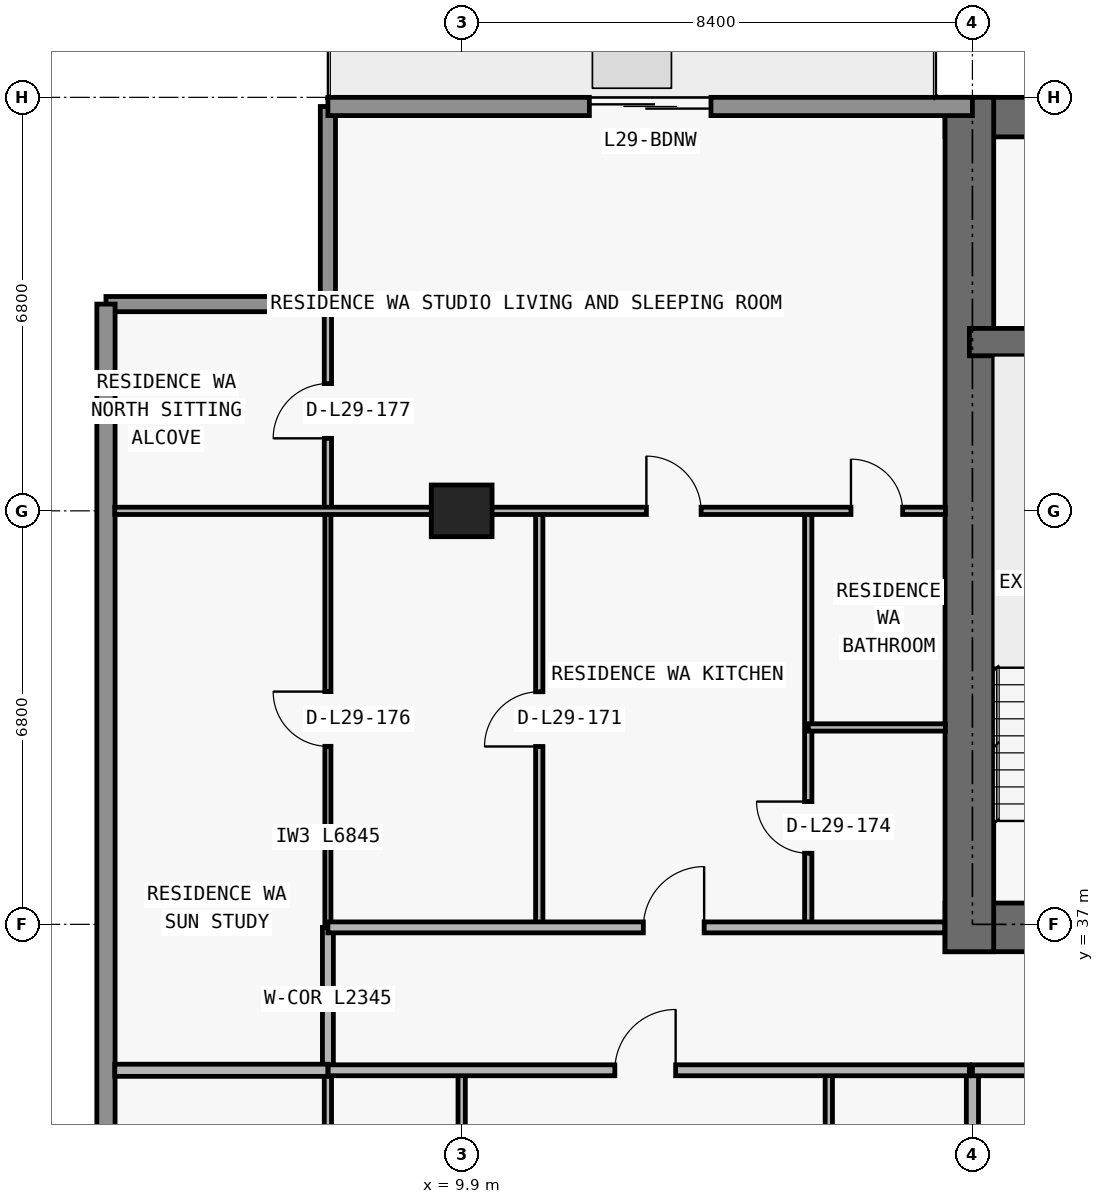
"""IFC4 building model, lengths in metres.
Left out: names, types, materials, properties, quantities, classifications, styles, units other than length and angle.
Written with IfcOpenShell. Run it as: python <this file> out.ifc"""

import sys

from ifc_helpers import new_model, si_unit, direction, frame, frame_2d, origin, origin_2d, place, context, subcontext, project, spatial, rectangle, extrude, element, fill, save


model = new_model("IFC4")
c1 = context("Model", 3, precision=1e-05, world=origin(), true_north=direction((0.0, 1.0)))
c2 = subcontext(c1, "Body", "Model", "MODEL_VIEW")
j1 = project(units=[si_unit("LENGTHUNIT", "METRE"), si_unit("PLANEANGLEUNIT", "RADIAN")], contexts=[c1])
p1 = place(None, origin())
s1 = spatial("IfcSite", under=j1, at=p1, CompositionType="ELEMENT")
p2 = place(p1, origin())
s2 = spatial("IfcBuilding", under=s1, at=p2, CompositionType="ELEMENT")
p3 = place(p2, frame((0.0, 0.0, 109.2)))
s3 = spatial("IfcBuildingStorey", under=s2, at=p3, CompositionType="ELEMENT", Elevation=109.2)
p4 = place(p3, frame((9.9, 43.8, 0.0), z_axis=(0.0, 0.0, 1.0), x_axis=(1.0, 0.0, 0.0)))
e1 = element("IfcColumn", 1, at=p4, inside=s3, PredefinedType="COLUMN", context=c2, shape_type="SweptSolid", body=[
    extrude(rectangle(XDim=1.0, YDim=0.85, at=origin_2d()), origin(), (0.0, 0.0, 1.0), 3.05),
])
p5 = place(p3, frame((17.85, 36.95, 0.0), z_axis=(0.0, 0.0, 1.0), x_axis=(1.0, 0.0, 0.0)))
e2 = element("IfcWall", 2, at=p5, inside=s3, PredefinedType="SHEAR", context=c2, shape_type="SweptSolid", body=[
    extrude(rectangle(XDim=42.1, YDim=0.8, at=frame_2d((21.05, 0.0))), origin(), (0.0, 0.0, 1.0), 3.05),
])
p6 = place(p5, frame((14.45, 0.0, 0.0)))
e3 = element("IfcOpeningElement", 3, at=p6, cuts=e2, PredefinedType="OPENING", context=c2, shape_type="SweptSolid", body=[
    extrude(rectangle(XDim=1.1, YDim=2.15, at=frame_2d((0.55, 1.075))), frame((0.0, 0.41, 0.0), z_axis=(0.0, -1.0, 0.0), x_axis=(1.0, 0.0, 0.0)), (0.0, 0.0, 1.0), 0.82),
])
p7 = place(p5, frame((6.3, 0.0, 0.0)))
e4 = element("IfcOpeningElement", 4, at=p7, cuts=e2, PredefinedType="OPENING", context=c2, shape_type="SweptSolid", body=[
    extrude(rectangle(XDim=1.05, YDim=2.15, at=frame_2d((0.525, 1.075))), frame((0.0, 0.41, 0.0), z_axis=(0.0, -1.0, 0.0), x_axis=(1.0, 0.0, 0.0)), (0.0, 0.0, 1.0), 0.82),
])
p8 = place(p5, frame((34.8, 0.0, 0.0)))
e5 = element("IfcOpeningElement", 5, at=p8, cuts=e2, PredefinedType="OPENING", context=c2, shape_type="SweptSolid", body=[
    extrude(rectangle(XDim=1.05, YDim=2.15, at=frame_2d((0.525, 1.075))), frame((0.0, 0.41, 0.0), z_axis=(0.0, -1.0, 0.0), x_axis=(1.0, 0.0, 0.0)), (0.0, 0.0, 1.0), 0.82),
])
p9 = place(p5, frame((10.913, 0.0, 0.0)))
e6 = element("IfcOpeningElement", 6, at=p9, cuts=e2, PredefinedType="OPENING", context=c2, shape_type="SweptSolid", body=[
    extrude(rectangle(XDim=1.05, YDim=2.15, at=frame_2d((0.525, 1.075))), frame((0.0, 0.41, 0.0), z_axis=(0.0, -1.0, 0.0), x_axis=(1.0, 0.0, 0.0)), (0.0, 0.0, 1.0), 0.82),
])
p10 = place(p5, frame((24.15, 0.0, 0.0)))
e7 = element("IfcOpeningElement", 7, at=p10, cuts=e2, PredefinedType="OPENING", context=c2, shape_type="SweptSolid", body=[
    extrude(rectangle(XDim=1.05, YDim=2.15, at=frame_2d((0.525, 1.075))), frame((0.0, 0.41, 0.0), z_axis=(0.0, -1.0, 0.0), x_axis=(1.0, 0.0, 0.0)), (0.0, 0.0, 1.0), 0.82),
])
p11 = place(p3, frame((17.85, 50.275, 0.0), z_axis=(0.0, 0.0, 1.0), x_axis=(1.0, 0.0, 0.0)))
e8 = element("IfcWall", 8, at=p11, inside=s3, PredefinedType="SHEAR", context=c2, shape_type="SweptSolid", body=[
    extrude(rectangle(XDim=42.1, YDim=0.65, at=frame_2d((21.05, 0.0))), origin(), (0.0, 0.0, 1.0), 3.05),
])
p12 = place(p3, frame((18.25, 36.55, 0.0), z_axis=(0.0, 0.0, 1.0), x_axis=(0.0, 1.0, 0.0)))
e9 = element("IfcWall", 9, at=p12, inside=s3, PredefinedType="SHEAR", context=c2, shape_type="SweptSolid", body=[
    extrude(rectangle(XDim=14.05, YDim=0.8, at=frame_2d((7.025, 0.0))), origin(), (0.0, 0.0, 1.0), 3.05),
])
p13 = place(p3, frame((18.25, 46.575, 0.0), z_axis=(0.0, 0.0, 1.0), x_axis=(1.0, 0.0, 0.0)))
e10 = element("IfcWall", 10, at=p13, inside=s3, PredefinedType="SHEAR", context=c2, shape_type="SweptSolid", body=[
    extrude(rectangle(XDim=41.3, YDim=0.45, at=frame_2d((20.65, 0.0))), origin(), (0.0, 0.0, 1.0), 3.05),
])
p14 = place(p13, frame((7.625, 0.0, 0.0)))
e11 = element("IfcOpeningElement", 11, at=p14, cuts=e10, PredefinedType="OPENING", context=c2, shape_type="SweptSolid", body=[
    extrude(rectangle(XDim=1.05, YDim=2.15, at=frame_2d((0.525, 1.075))), frame((0.0, 0.235, 0.0), z_axis=(0.0, -1.0, 0.0), x_axis=(1.0, 0.0, 0.0)), (0.0, 0.0, 1.0), 0.47),
])
p15 = place(p13, frame((32.675, 0.0, 0.0)))
e12 = element("IfcOpeningElement", 12, at=p15, cuts=e10, PredefinedType="OPENING", context=c2, shape_type="SweptSolid", body=[
    extrude(rectangle(XDim=1.05, YDim=2.15, at=frame_2d((0.525, 1.075))), frame((0.0, 0.235, 0.0), z_axis=(0.0, -1.0, 0.0), x_axis=(1.0, 0.0, 0.0)), (0.0, 0.0, 1.0), 0.47),
])
p16 = place(p3, frame((4.05, 47.2, 0.0), z_axis=(0.0, 0.0, 1.0), x_axis=(1.0, 0.0, 0.0)))
e13 = element("IfcWall", 13, at=p16, inside=s3, PredefinedType="ELEMENTEDWALL", context=c2, shape_type="SweptSolid", body=[
    extrude(rectangle(XDim=3.65, YDim=0.25, at=frame_2d((1.825, 0.0))), origin(), (0.0, 0.0, 1.0), 3.05),
])
p17 = place(p3, frame((7.7, 47.2, 0.0), z_axis=(0.0, 0.0, 1.0), x_axis=(0.0, 1.0, 0.0)))
e14 = element("IfcWall", 14, at=p17, inside=s3, PredefinedType="ELEMENTEDWALL", context=c2, shape_type="SweptSolid", body=[
    extrude(rectangle(XDim=3.25, YDim=0.25, at=frame_2d((1.625, 0.0))), origin(), (0.0, 0.0, 1.0), 3.05),
])
p18 = place(p3, frame((4.05, 28.0, 0.0), z_axis=(0.0, 0.0, 1.0), x_axis=(0.0, 1.0, 0.0)))
e15 = element("IfcWall", 15, at=p18, inside=s3, PredefinedType="STANDARD", context=c2, shape_type="SweptSolid", body=[
    extrude(rectangle(XDim=19.2, YDim=0.3, at=frame_2d((9.6, 0.0))), origin(), (0.0, 0.0, 1.0), 3.05),
])
p19 = place(p3, frame((7.7, 50.45, 0.0), z_axis=(0.0, 0.0, 1.0), x_axis=(1.0, 0.0, 0.0)))
e16 = element("IfcWall", 16, at=p19, inside=s3, PredefinedType="STANDARD", context=c2, shape_type="SweptSolid", body=[
    extrude(rectangle(XDim=10.6, YDim=0.3, at=frame_2d((5.3, 0.0))), origin(), (0.0, 0.0, 1.0), 3.05),
])
p20 = place(p19, frame((4.3, 0.0, 0.0)))
e17 = element("IfcOpeningElement", 17, at=p20, cuts=e16, PredefinedType="OPENING", context=c2, shape_type="SweptSolid", body=[
    extrude(rectangle(XDim=2.0, YDim=2.3, at=frame_2d((1.0, 1.15))), frame((0.0, 0.16, 0.0), z_axis=(0.0, -1.0, 0.0), x_axis=(1.0, 0.0, 0.0)), (0.0, 0.0, 1.0), 0.32),
])
p21 = place(p3, frame((7.7, 30.24, 0.0), z_axis=(0.0, 0.0, 1.0), x_axis=(0.0, 1.0, 0.0)))
e18 = element("IfcWall", 18, at=p21, inside=s3, PredefinedType="PARTITIONING", context=c2, shape_type="SweptSolid", body=[
    extrude(rectangle(XDim=4.36, YDim=0.12, at=frame_2d((2.18, 0.0))), origin(), (0.0, 0.0, 1.0), 3.05),
])
p22 = place(p3, frame((7.7, 34.605, 0.0), z_axis=(0.0, 0.0, 1.0), x_axis=(0.0, 1.0, 0.0)))
e19 = element("IfcWall", 19, at=p22, inside=s3, PredefinedType="PARTITIONING", context=c2, shape_type="SweptSolid", body=[
    extrude(rectangle(XDim=2.345, YDim=0.18, at=frame_2d((1.172, 0.0))), origin(), (0.0, 0.0, 1.0), 3.05),
])
p23 = place(p3, frame((7.7, 36.955, 0.0), z_axis=(0.0, 0.0, 1.0), x_axis=(0.0, 1.0, 0.0)))
e20 = element("IfcWall", 20, at=p23, inside=s3, PredefinedType="MOVABLE", context=c2, shape_type="SweptSolid", body=[
    extrude(rectangle(XDim=6.845, YDim=0.1, at=frame_2d((3.422, 0.0))), origin(), (0.0, 0.0, 1.0), 3.05),
])
p24 = place(p23, frame((2.972, 0.0, 0.0)))
e21 = element("IfcOpeningElement", 21, at=p24, cuts=e20, PredefinedType="OPENING", context=c2, shape_type="SweptSolid", body=[
    extrude(rectangle(XDim=0.9, YDim=2.15, at=frame_2d((0.45, 1.075))), frame((0.0, 0.06, 0.0), z_axis=(0.0, -1.0, 0.0), x_axis=(1.0, 0.0, 0.0)), (0.0, 0.0, 1.0), 0.12),
])
p25 = place(p3, frame((7.7, 43.805, 0.0), z_axis=(0.0, 0.0, 1.0), x_axis=(0.0, 1.0, 0.0)))
e22 = element("IfcWall", 22, at=p25, inside=s3, PredefinedType="PARTITIONING", context=c2, shape_type="SweptSolid", body=[
    extrude(rectangle(XDim=3.275, YDim=0.12, at=frame_2d((1.638, 0.0))), origin(), (0.0, 0.0, 1.0), 3.05),
])
p26 = place(p25, frame((1.188, 0.0, 0.0)))
e23 = element("IfcOpeningElement", 23, at=p26, cuts=e22, PredefinedType="OPENING", context=c2, shape_type="SweptSolid", body=[
    extrude(rectangle(XDim=0.9, YDim=2.15, at=frame_2d((0.45, 1.075))), frame((0.0, 0.07, 0.0), z_axis=(0.0, -1.0, 0.0), x_axis=(1.0, 0.0, 0.0)), (0.0, 0.0, 1.0), 0.14),
])
p27 = place(p3, frame((9.9, 30.24, 0.0), z_axis=(0.0, 0.0, 1.0), x_axis=(0.0, 1.0, 0.0)))
e24 = element("IfcWall", 24, at=p27, inside=s3, PredefinedType="PARTITIONING", context=c2, shape_type="SweptSolid", body=[
    extrude(rectangle(XDim=4.36, YDim=0.12, at=frame_2d((2.18, 0.0))), origin(), (0.0, 0.0, 1.0), 2.174),
])
p28 = place(p3, frame((11.176, 36.95, 0.0), z_axis=(0.0, 0.0, 1.0), x_axis=(0.0, 1.0, 0.0)))
e25 = element("IfcWall", 25, at=p28, inside=s3, PredefinedType="PARTITIONING", context=c2, shape_type="SweptSolid", body=[
    extrude(rectangle(XDim=6.85, YDim=0.12, at=frame_2d((3.425, 0.0))), origin(), (0.0, 0.0, 1.0), 3.05),
])
p29 = place(p28, frame((2.975, 0.0, 0.0)))
e26 = element("IfcOpeningElement", 26, at=p29, cuts=e25, PredefinedType="OPENING", context=c2, shape_type="SweptSolid", body=[
    extrude(rectangle(XDim=0.9, YDim=2.15, at=frame_2d((0.45, 1.075))), frame((0.0, 0.07, 0.0), z_axis=(0.0, -1.0, 0.0), x_axis=(1.0, 0.0, 0.0)), (0.0, 0.0, 1.0), 0.14),
])
p30 = place(p3, frame((15.6, 36.95, 0.0), z_axis=(0.0, 0.0, 1.0), x_axis=(0.0, 1.0, 0.0)))
e27 = element("IfcWall", 27, at=p30, inside=s3, PredefinedType="PARTITIONING", context=c2, shape_type="SweptSolid", body=[
    extrude(rectangle(XDim=6.85, YDim=0.12, at=frame_2d((3.425, 0.0))), origin(), (0.0, 0.0, 1.0), 3.05),
])
p31 = place(p30, frame((1.219, 0.0, 0.0)))
e28 = element("IfcOpeningElement", 28, at=p31, cuts=e27, PredefinedType="OPENING", context=c2, shape_type="SweptSolid", body=[
    extrude(rectangle(XDim=0.85, YDim=2.1, at=frame_2d((0.425, 1.05))), frame((0.0, 0.07, 0.0), z_axis=(0.0, -1.0, 0.0), x_axis=(1.0, 0.0, 0.0)), (0.0, 0.0, 1.0), 0.14),
])
p32 = place(p3, frame((15.938, 30.24, 0.0), z_axis=(0.0, 0.0, 1.0), x_axis=(0.0, 1.0, 0.0)))
e29 = element("IfcWall", 29, at=p32, inside=s3, PredefinedType="PARTITIONING", context=c2, shape_type="SweptSolid", body=[
    extrude(rectangle(XDim=4.36, YDim=0.12, at=frame_2d((2.18, 0.0))), origin(), (0.0, 0.0, 1.0), 3.05),
])
p33 = place(p32, frame((1.755, 0.0, 0.0)))
e30 = element("IfcOpeningElement", 30, at=p33, cuts=e29, PredefinedType="OPENING", context=c2, shape_type="SweptSolid", body=[
    extrude(rectangle(XDim=0.85, YDim=2.1, at=frame_2d((0.425, 1.05))), frame((0.0, 0.07, 0.0), z_axis=(0.0, -1.0, 0.0), x_axis=(1.0, 0.0, 0.0)), (0.0, 0.0, 1.0), 0.14),
])
p34 = place(p3, frame((18.3, 30.24, 0.0), z_axis=(0.0, 0.0, 1.0), x_axis=(0.0, 1.0, 0.0)))
e31 = element("IfcWall", 31, at=p34, inside=s3, PredefinedType="PARTITIONING", context=c2, shape_type="SweptSolid", body=[
    extrude(rectangle(XDim=4.36, YDim=0.2, at=frame_2d((2.18, 0.0))), origin(), (0.0, 0.0, 1.0), 2.174),
])
p35 = place(p3, frame((4.195, 34.6, 0.0), z_axis=(0.0, 0.0, 1.0), x_axis=(1.0, 0.0, 0.0)))
e32 = element("IfcWall", 32, at=p35, inside=s3, PredefinedType="PARTITIONING", context=c2, shape_type="SweptSolid", body=[
    extrude(rectangle(XDim=3.505, YDim=0.2, at=frame_2d((1.752, 0.0))), origin(), (0.0, 0.0, 1.0), 3.05),
])
p36 = place(p3, frame((7.705, 34.6, 0.0), z_axis=(0.0, 0.0, 1.0), x_axis=(1.0, 0.0, 0.0)))
e33 = element("IfcWall", 33, at=p36, inside=s3, PredefinedType="PARTITIONING", context=c2, shape_type="SweptSolid", body=[
    extrude(rectangle(XDim=10.545, YDim=0.18, at=frame_2d((5.272, 0.0))), origin(), (0.0, 0.0, 1.0), 3.05),
])
p37 = place(p36, frame((4.714, 0.0, 0.0)))
e34 = element("IfcOpeningElement", 34, at=p37, cuts=e33, PredefinedType="OPENING", context=c2, shape_type="SweptSolid", body=[
    extrude(rectangle(XDim=1.0, YDim=2.2, at=frame_2d((0.5, 1.1))), frame((0.0, 0.1, 0.0), z_axis=(0.0, -1.0, 0.0), x_axis=(1.0, 0.0, 0.0)), (0.0, 0.0, 1.0), 0.2),
])
p38 = place(p3, frame((18.3, 34.6, 0.0), z_axis=(0.0, 0.0, 1.0), x_axis=(1.0, 0.0, 0.0)))
e35 = element("IfcWall", 35, at=p38, inside=s3, PredefinedType="PARTITIONING", context=c2, shape_type="SweptSolid", body=[
    extrude(rectangle(XDim=8.35, YDim=0.18, at=frame_2d((4.175, 0.0))), origin(), (0.0, 0.0, 1.0), 3.05),
])
p39 = place(p38, frame((2.691, 0.0, 0.0)))
e36 = element("IfcOpeningElement", 36, at=p39, cuts=e35, PredefinedType="OPENING", context=c2, shape_type="SweptSolid", body=[
    extrude(rectangle(XDim=1.0, YDim=2.2, at=frame_2d((0.5, 1.1))), frame((0.0, 0.1, 0.0), z_axis=(0.0, -1.0, 0.0), x_axis=(1.0, 0.0, 0.0)), (0.0, 0.0, 1.0), 0.2),
])
p40 = place(p3, frame((7.7, 36.95, 0.0), z_axis=(0.0, 0.0, 1.0), x_axis=(1.0, 0.0, 0.0)))
e37 = element("IfcWall", 37, at=p40, inside=s3, PredefinedType="PARTITIONING", context=c2, shape_type="SweptSolid", body=[
    extrude(rectangle(XDim=10.145, YDim=0.18, at=frame_2d((5.073, 0.0))), origin(), (0.0, 0.0, 1.0), 3.05),
])
p41 = place(p40, frame((5.188, 0.0, 0.0)))
e38 = element("IfcOpeningElement", 38, at=p41, cuts=e37, PredefinedType="OPENING", context=c2, shape_type="SweptSolid", body=[
    extrude(rectangle(XDim=1.0, YDim=2.2, at=frame_2d((0.5, 1.1))), frame((0.0, 0.1, 0.0), z_axis=(0.0, -1.0, 0.0), x_axis=(1.0, 0.0, 0.0)), (0.0, 0.0, 1.0), 0.2),
])
p42 = place(p3, frame((15.6, 40.238, 0.0), z_axis=(0.0, 0.0, 1.0), x_axis=(1.0, 0.0, 0.0)))
e39 = element("IfcWall", 39, at=p42, inside=s3, PredefinedType="PARTITIONING", context=c2, shape_type="SweptSolid", body=[
    extrude(rectangle(XDim=2.255, YDim=0.12, at=frame_2d((1.127, 0.0))), origin(), (0.0, 0.0, 1.0), 3.05),
])
p43 = place(p3, frame((4.195, 43.8, 0.0), z_axis=(0.0, 0.0, 1.0), x_axis=(1.0, 0.0, 0.0)))
e40 = element("IfcWall", 40, at=p43, inside=s3, PredefinedType="PARTITIONING", context=c2, shape_type="SweptSolid", body=[
    extrude(rectangle(XDim=13.66, YDim=0.12, at=frame_2d((6.83, 0.0))), origin(), (0.0, 0.0, 1.0), 2.339),
])
p44 = place(p43, frame((8.743, 0.0, 0.0)))
e41 = element("IfcOpeningElement", 41, at=p44, cuts=e40, PredefinedType="OPENING", context=c2, shape_type="SweptSolid", body=[
    extrude(rectangle(XDim=0.9, YDim=2.15, at=frame_2d((0.45, 1.075))), frame((0.0, 0.07, 0.0), z_axis=(0.0, -1.0, 0.0), x_axis=(1.0, 0.0, 0.0)), (0.0, 0.0, 1.0), 0.14),
])
p45 = place(p43, frame((12.107, 0.0, 0.0)))
e42 = element("IfcOpeningElement", 42, at=p45, cuts=e40, PredefinedType="OPENING", context=c2, shape_type="SweptSolid", body=[
    extrude(rectangle(XDim=0.85, YDim=2.1, at=frame_2d((0.425, 1.05))), frame((0.0, 0.07, 0.0), z_axis=(0.0, -1.0, 0.0), x_axis=(1.0, 0.0, 0.0)), (0.0, 0.0, 1.0), 0.14),
])
p46 = place(p20, origin())
e43 = element("IfcDoor", 43, at=p46, inside=s3, OperationType="DOUBLE_DOOR_SLIDING", PredefinedType="DOOR", context=c2, shape_type="SweptSolid", body=[
    extrude(rectangle(XDim=2.0, YDim=2.3, at=frame_2d((1.0, 1.15))), frame((0.0, 0.025, 0.0), z_axis=(0.0, -1.0, 0.0), x_axis=(1.0, 0.0, 0.0)), (0.0, 0.0, 1.0), 0.05),
])
fill(e17, e43)
p47 = place(p37, origin())
e44 = element("IfcDoor", 44, at=p47, inside=s3, OperationType="SINGLE_SWING_RIGHT", PredefinedType="DOOR", context=c2, shape_type="SweptSolid", body=[
    extrude(rectangle(XDim=1.0, YDim=2.2, at=frame_2d((0.5, 1.1))), frame((0.0, 0.025, 0.0), z_axis=(0.0, -1.0, 0.0), x_axis=(1.0, 0.0, 0.0)), (0.0, 0.0, 1.0), 0.05),
])
fill(e34, e44)
p48 = place(p29, origin())
e45 = element("IfcDoor", 45, at=p48, inside=s3, OperationType="SINGLE_SWING_LEFT", PredefinedType="DOOR", context=c2, shape_type="SweptSolid", body=[
    extrude(rectangle(XDim=0.9, YDim=2.15, at=frame_2d((0.45, 1.075))), frame((0.0, 0.025, 0.0), z_axis=(0.0, -1.0, 0.0), x_axis=(1.0, 0.0, 0.0)), (0.0, 0.0, 1.0), 0.05),
])
fill(e26, e45)
p49 = place(p41, origin())
e46 = element("IfcDoor", 46, at=p49, inside=s3, OperationType="SINGLE_SWING_RIGHT", PredefinedType="DOOR", context=c2, shape_type="SweptSolid", body=[
    extrude(rectangle(XDim=1.0, YDim=2.2, at=frame_2d((0.5, 1.1))), frame((0.0, 0.025, 0.0), z_axis=(0.0, -1.0, 0.0), x_axis=(1.0, 0.0, 0.0)), (0.0, 0.0, 1.0), 0.05),
])
fill(e38, e46)
p50 = place(p44, origin())
e47 = element("IfcDoor", 47, at=p50, inside=s3, OperationType="SINGLE_SWING_LEFT", PredefinedType="DOOR", context=c2, shape_type="SweptSolid", body=[
    extrude(rectangle(XDim=0.9, YDim=2.15, at=frame_2d((0.45, 1.075))), frame((0.0, 0.025, 0.0), z_axis=(0.0, -1.0, 0.0), x_axis=(1.0, 0.0, 0.0)), (0.0, 0.0, 1.0), 0.05),
])
fill(e41, e47)
p51 = place(p31, origin())
e48 = element("IfcDoor", 48, at=p51, inside=s3, OperationType="SINGLE_SWING_RIGHT", PredefinedType="DOOR", context=c2, shape_type="SweptSolid", body=[
    extrude(rectangle(XDim=0.85, YDim=2.1, at=frame_2d((0.425, 1.05))), frame((0.0, 0.025, 0.0), z_axis=(0.0, -1.0, 0.0), x_axis=(1.0, 0.0, 0.0)), (0.0, 0.0, 1.0), 0.05),
])
fill(e28, e48)
p52 = place(p45, origin())
e49 = element("IfcDoor", 49, at=p52, inside=s3, OperationType="SINGLE_SWING_LEFT", PredefinedType="DOOR", context=c2, shape_type="SweptSolid", body=[
    extrude(rectangle(XDim=0.85, YDim=2.1, at=frame_2d((0.425, 1.05))), frame((0.0, 0.025, 0.0), z_axis=(0.0, -1.0, 0.0), x_axis=(1.0, 0.0, 0.0)), (0.0, 0.0, 1.0), 0.05),
])
fill(e42, e49)
p53 = place(p24, origin())
e50 = element("IfcDoor", 50, at=p53, inside=s3, OperationType="SINGLE_SWING_RIGHT", PredefinedType="DOOR", context=c2, shape_type="SweptSolid", body=[
    extrude(rectangle(XDim=0.9, YDim=2.15, at=frame_2d((0.45, 1.075))), frame((0.0, 0.025, 0.0), z_axis=(0.0, -1.0, 0.0), x_axis=(1.0, 0.0, 0.0)), (0.0, 0.0, 1.0), 0.05),
])
fill(e21, e50)
p54 = place(p26, origin())
e51 = element("IfcDoor", 51, at=p54, inside=s3, OperationType="SINGLE_SWING_LEFT", PredefinedType="DOOR", context=c2, shape_type="SweptSolid", body=[
    extrude(rectangle(XDim=0.9, YDim=2.15, at=frame_2d((0.45, 1.075))), frame((0.0, 0.025, 0.0), z_axis=(0.0, -1.0, 0.0), x_axis=(1.0, 0.0, 0.0)), (0.0, 0.0, 1.0), 0.05),
])
fill(e23, e51)
save(model, sys.argv[1])
